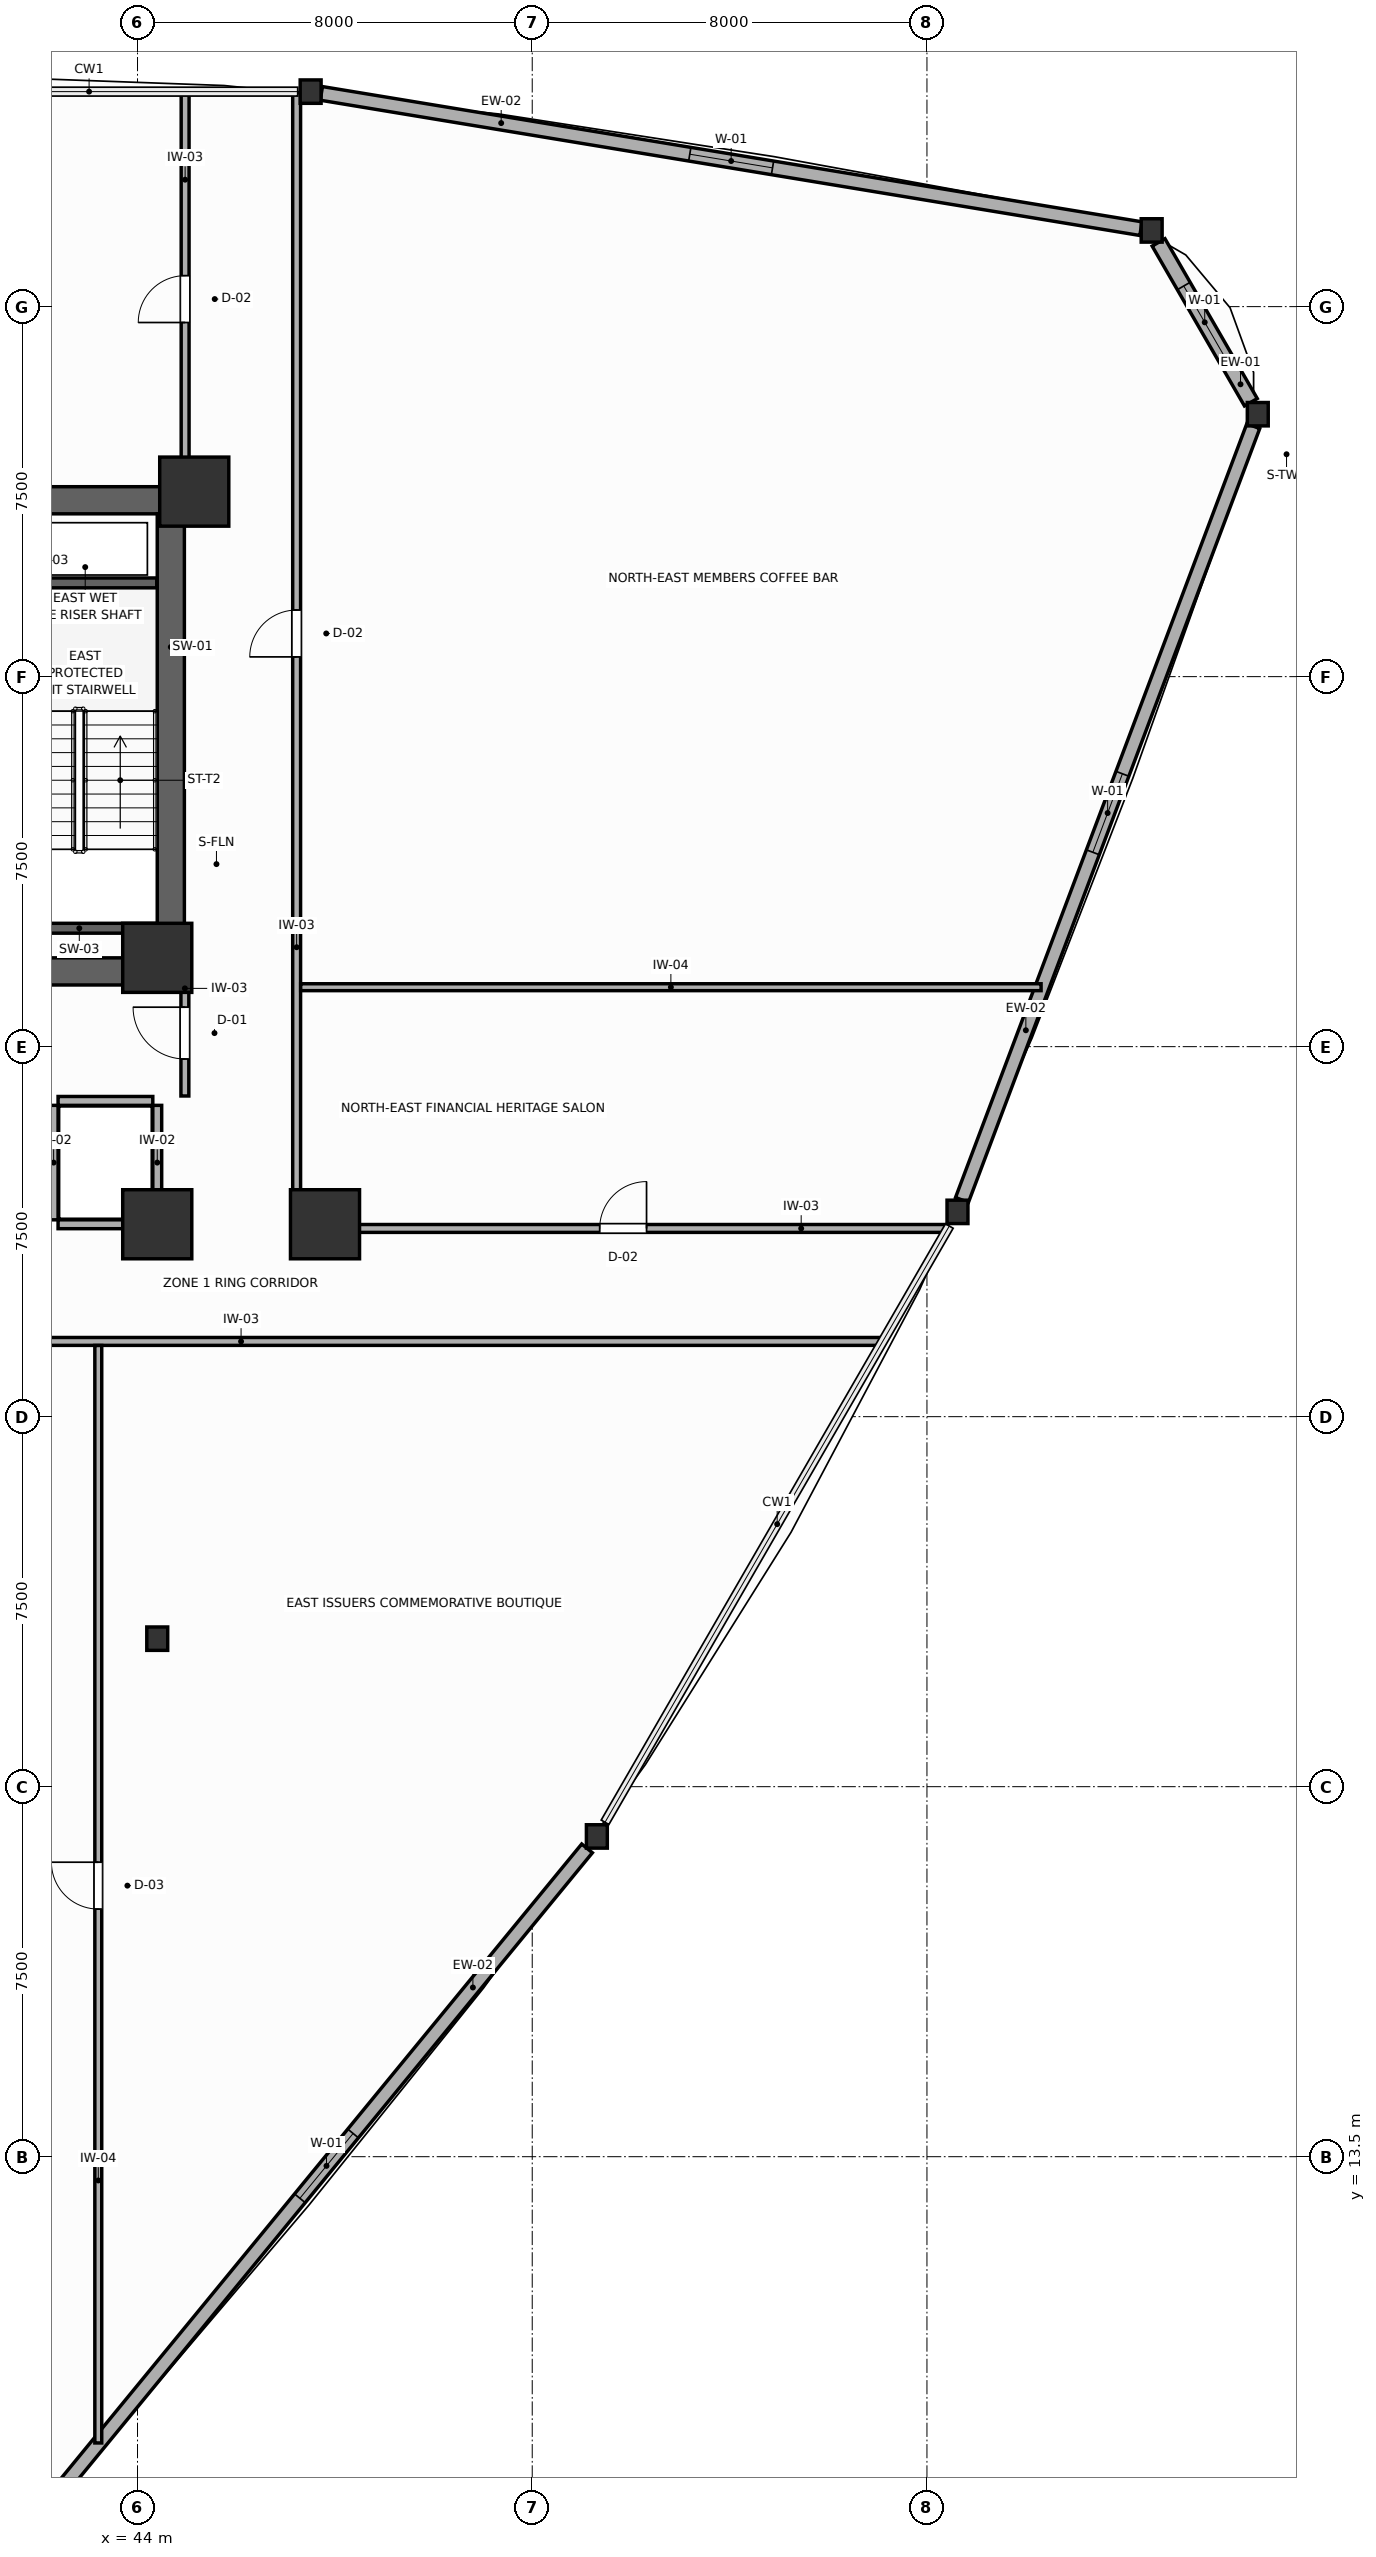
"""IFC4 building model, lengths in metres.
Left out: names, types, materials, properties, quantities, classifications, styles, units other than length and angle.
Written with IfcOpenShell. Run it as: python <this file> out.ifc"""

import sys

from ifc_helpers import new_model, si_unit, direction, frame, frame_2d, origin, origin_2d, place, context, subcontext, project, spatial, rectangle, i_section, extrude, source, transform, mapped, element, fill, save


model = new_model("IFC4")
c1 = context("Model", 3, precision=1e-05, world=origin(), true_north=direction((0.0, 1.0)))
c2 = subcontext(c1, "Body", "Model", "MODEL_VIEW")
j1 = project(units=[si_unit("LENGTHUNIT", "METRE"), si_unit("PLANEANGLEUNIT", "RADIAN")], contexts=[c1])
p1 = place(None, origin())
s1 = spatial("IfcSite", under=j1, at=p1, CompositionType="ELEMENT")
p2 = place(p1, origin())
s2 = spatial("IfcBuilding", under=s1, at=p2, CompositionType="ELEMENT")
p3 = place(p2, frame((0.0, 0.0, 87.3)))
s3 = spatial("IfcBuildingStorey", under=s2, at=p3, CompositionType="ELEMENT", Elevation=87.3)
p4 = place(p3, frame((27.05, 47.075, 0.0), z_axis=(0.0, 0.0, 1.0), x_axis=(1.0, 0.0, 0.0)))
e1 = element("IfcWall", 1, at=p4, inside=s3, PredefinedType="SHEAR", context=c2, shape_type="SweptSolid", body=[
    extrude(rectangle(XDim=17.9, YDim=0.55, at=frame_2d((8.95, 0.0))), origin(), (0.0, 0.0, 1.0), 3.9),
])
p5 = place(p3, frame((27.05, 37.525, 0.0), z_axis=(0.0, 0.0, 1.0), x_axis=(1.0, 0.0, 0.0)))
e2 = element("IfcWall", 2, at=p5, inside=s3, PredefinedType="SHEAR", context=c2, shape_type="SweptSolid", body=[
    extrude(rectangle(XDim=17.9, YDim=0.55, at=frame_2d((8.95, 0.0))), origin(), (0.0, 0.0, 1.0), 3.9),
])
p6 = place(p5, frame((4.975, 0.0, 0.0)))
e3 = element("IfcOpeningElement", 3, at=p6, cuts=e2, PredefinedType="OPENING", context=c2, shape_type="SweptSolid", body=[
    extrude(rectangle(XDim=1.05, YDim=2.1, at=frame_2d((0.525, 1.05))), frame((0.0, 0.285, 0.0), z_axis=(0.0, -1.0, 0.0), x_axis=(1.0, 0.0, 0.0)), (0.0, 0.0, 1.0), 0.57),
])
p7 = place(p5, frame((11.875, 0.0, 0.0)))
e4 = element("IfcOpeningElement", 4, at=p7, cuts=e2, PredefinedType="OPENING", context=c2, shape_type="SweptSolid", body=[
    extrude(rectangle(XDim=1.05, YDim=2.1, at=frame_2d((0.525, 1.05))), frame((0.0, 0.285, 0.0), z_axis=(0.0, -1.0, 0.0), x_axis=(1.0, 0.0, 0.0)), (0.0, 0.0, 1.0), 0.57),
])
p8 = place(p3, frame((44.675, 37.8, 0.0), z_axis=(0.0, 0.0, 1.0), x_axis=(0.0, 1.0, 0.0)))
e5 = element("IfcWall", 5, at=p8, inside=s3, PredefinedType="SHEAR", context=c2, shape_type="SweptSolid", body=[
    extrude(rectangle(XDim=9.0, YDim=0.55, at=frame_2d((4.5, 0.0))), origin(), (0.0, 0.0, 1.0), 3.9),
])
m1 = source(origin(), c2, "Body", "SweptSolid", [
    extrude(rectangle(XDim=1.4, YDim=1.4, at=origin_2d()), origin(), (0.0, 0.0, 1.0), 3.9),
])
for number, where, z_axis, x_axis in (
    (6, (45.15, 47.25, 0.0), (0.0, 0.0, 1.0), (1.0, 0.0, 0.0)),
    (7, (44.4, 37.8, 0.0), (0.0, 0.0, 1.0), (1.0, 0.0, 0.0)),
    (8, (44.4, 32.4, 0.0), (0.0, 0.0, 1.0), (1.0, 0.0, 0.0)),
    (9, (47.8, 32.4, 0.0), (0.0, 0.0, 1.0), (1.0, 0.0, 0.0)),
):
    element("IfcColumn", number, at=place(p3, frame(where, z_axis=z_axis, x_axis=x_axis)), inside=s3, PredefinedType="COLUMN", context=c2, shape_type="MappedRepresentation", body=[
        mapped(m1, transform((0.0, 0.0, 0.0), scale=1.0)),
    ])
m2 = source(origin(), c2, "Body", "SweptSolid", [
    extrude(i_section(OverallWidth=0.424, OverallDepth=0.474, WebThickness=0.045, FlangeThickness=0.072, FilletRadius=0.015, at=origin_2d()), origin(), (0.0, 0.0, 1.0), 3.9),
])
for number, where, z_axis, x_axis in (
    (10, (44.4, 24.0, 0.0), (0.0, 0.0, 1.0), (1.0, 0.0, 0.0)),
    (11, (66.705, 48.82, 0.0), (0.0, 0.0, 1.0), (1.0, 0.0, 0.0)),
    (12, (64.554, 52.544, 0.0), (0.0, 0.0, 1.0), (1.0, 0.0, 0.0)),
    (13, (47.509, 55.358, 0.0), (0.0, 0.0, 1.0), (1.0, 0.0, 0.0)),
    (14, (53.31, 19.991, 0.0), (0.0, 0.0, 1.0), (1.0, 0.0, 0.0)),
    (15, (60.619, 32.651, 0.0), (0.0, 0.0, 1.0), (1.0, 0.0, 0.0)),
):
    element("IfcColumn", number, at=place(p3, frame(where, z_axis=z_axis, x_axis=x_axis)), inside=s3, PredefinedType="COLUMN", context=c2, shape_type="MappedRepresentation", body=[
        mapped(m2, transform((0.0, 0.0, 0.0), scale=1.0)),
    ])
p9 = place(p3, frame((66.565, 49.062, 0.0), z_axis=(0.0, 0.0, 1.0), x_axis=(-0.500012356405, 0.866018269693, 0.0)))
e16 = element("IfcWall", 16, at=p9, inside=s3, PredefinedType="SOLIDWALL", context=c2, shape_type="SweptSolid", body=[
    extrude(rectangle(XDim=3.742, YDim=0.3, at=frame_2d((1.871, 0.0))), origin(), (0.0, 0.0, 1.0), 3.23),
])
p10 = place(p9, frame((1.021, 0.0, 0.75)))
e17 = element("IfcOpeningElement", 17, at=p10, cuts=e16, PredefinedType="OPENING", context=c2, shape_type="SweptSolid", body=[
    extrude(rectangle(XDim=1.7, YDim=1.75, at=frame_2d((0.85, 0.875))), frame((0.0, 0.16, 0.0), z_axis=(0.0, -1.0, 0.0), x_axis=(1.0, 0.0, 0.0)), (0.0, 0.0, 1.0), 0.32),
])
p11 = place(p3, frame((64.337, 52.58, 0.0), z_axis=(0.0, 0.0, 1.0), x_axis=(-0.986649040197, 0.162860896097, 0.0)))
e18 = element("IfcWall", 18, at=p11, inside=s3, PredefinedType="SOLIDWALL", context=c2, shape_type="SweptSolid", body=[
    extrude(rectangle(XDim=16.836, YDim=0.28, at=frame_2d((8.418, 0.0))), origin(), (0.0, 0.0, 1.0), 3.23),
])
p12 = place(p11, frame((7.568, 0.0, 0.75)))
e19 = element("IfcOpeningElement", 19, at=p12, cuts=e18, PredefinedType="OPENING", context=c2, shape_type="SweptSolid", body=[
    extrude(rectangle(XDim=1.7, YDim=1.75, at=frame_2d((0.85, 0.875))), frame((0.0, 0.15, 0.0), z_axis=(0.0, -1.0, 0.0), x_axis=(1.0, 0.0, 0.0)), (0.0, 0.0, 1.0), 0.3),
])
p13 = place(p3, frame((42.549, 6.878, 0.0), z_axis=(0.0, 0.0, 1.0), x_axis=(0.634372560511, 0.77302746036, 0.0)))
e20 = element("IfcWall", 20, at=p13, inside=s3, PredefinedType="SOLIDWALL", context=c2, shape_type="SweptSolid", body=[
    extrude(rectangle(XDim=16.65, YDim=0.28, at=frame_2d((8.325, 0.0))), origin(), (0.0, 0.0, 1.0), 3.23),
])
p14 = place(p13, frame((7.475, 0.0, 0.75)))
e21 = element("IfcOpeningElement", 21, at=p14, cuts=e20, PredefinedType="OPENING", context=c2, shape_type="SweptSolid", body=[
    extrude(rectangle(XDim=1.7, YDim=1.75, at=frame_2d((0.85, 0.875))), frame((0.0, 0.15, 0.0), z_axis=(0.0, -1.0, 0.0), x_axis=(1.0, 0.0, 0.0)), (0.0, 0.0, 1.0), 0.3),
])
p15 = place(p3, frame((60.71, 32.893, 0.0), z_axis=(0.0, 0.0, 1.0), x_axis=(0.352291780657, 0.935890218605, 0.0)))
e22 = element("IfcWall", 22, at=p15, inside=s3, PredefinedType="SOLIDWALL", context=c2, shape_type="SweptSolid", body=[
    extrude(rectangle(XDim=16.759, YDim=0.28, at=frame_2d((8.379, 0.0))), origin(), (0.0, 0.0, 1.0), 3.23),
])
p16 = place(p15, frame((7.53, 0.0, 0.75)))
e23 = element("IfcOpeningElement", 23, at=p16, cuts=e22, PredefinedType="OPENING", context=c2, shape_type="SweptSolid", body=[
    extrude(rectangle(XDim=1.7, YDim=1.75, at=frame_2d((0.85, 0.875))), frame((0.0, 0.15, 0.0), z_axis=(0.0, -1.0, 0.0), x_axis=(1.0, 0.0, 0.0)), (0.0, 0.0, 1.0), 0.3),
])
for number, where, z_axis, x_axis in (
    (24, (41.25, 45.4, 0.0), (0.0, 0.0, 1.0), (1.0, 0.0, 0.0)),
    (25, (41.25, 38.4, 0.0), (0.0, 0.0, 1.0), (1.0, 0.0, 0.0)),
):
    element("IfcWall", number, at=place(p3, frame(where, z_axis=z_axis, x_axis=x_axis)), inside=s3, PredefinedType="SHEAR", context=c2, shape_type="SweptSolid", body=[
        extrude(rectangle(XDim=3.14, YDim=0.2, at=frame_2d((1.57, 0.0))), origin(), (0.0, 0.0, 1.0), 3.9),
    ])
p17 = place(p3, frame((42.39, 34.9, 0.0), z_axis=(0.0, 0.0, 1.0), x_axis=(1.0, 0.0, 0.0)))
e26 = element("IfcWall", 26, at=p17, inside=s3, PredefinedType="PARTITIONING", context=c2, shape_type="SweptSolid", body=[
    extrude(rectangle(XDim=1.92, YDim=0.18, at=frame_2d((0.96, 0.0))), origin(), (0.0, 0.0, 1.0), 3.68),
])
p18 = place(p3, frame((42.39, 32.4, 0.0), z_axis=(0.0, 0.0, 1.0), x_axis=(1.0, 0.0, 0.0)))
e27 = element("IfcWall", 27, at=p18, inside=s3, PredefinedType="PARTITIONING", context=c2, shape_type="SweptSolid", body=[
    extrude(rectangle(XDim=1.92, YDim=0.18, at=frame_2d((0.96, 0.0))), origin(), (0.0, 0.0, 1.0), 3.18),
])
for number, where, z_axis, x_axis in (
    (28, (42.3, 32.49, 0.0), (0.0, 0.0, 1.0), (0.0, 1.0, 0.0)),
    (29, (44.4, 32.49, 0.0), (0.0, 0.0, 1.0), (0.0, 1.0, 0.0)),
):
    element("IfcWall", number, at=place(p3, frame(where, z_axis=z_axis, x_axis=x_axis)), inside=s3, PredefinedType="PARTITIONING", context=c2, shape_type="SweptSolid", body=[
        extrude(rectangle(XDim=2.32, YDim=0.18, at=frame_2d((1.16, 0.0))), origin(), (0.0, 0.0, 1.0), 3.68),
    ])
p19 = place(p3, frame((44.96, 35.0, 0.0), z_axis=(0.0, 0.0, 1.0), x_axis=(0.0, 1.0, 0.0)))
e30 = element("IfcWall", 30, at=p19, inside=s3, PredefinedType="PARTITIONING", context=c2, shape_type="SweptSolid", body=[
    extrude(rectangle(XDim=2.65, YDim=0.16, at=frame_2d((1.325, 0.0))), origin(), (0.0, 0.0, 1.0), 3.68),
])
p20 = place(p19, frame((0.75, 0.0, 0.0)))
e31 = element("IfcOpeningElement", 31, at=p20, cuts=e30, PredefinedType="OPENING", context=c2, shape_type="SweptSolid", body=[
    extrude(rectangle(XDim=1.05, YDim=2.1, at=frame_2d((0.525, 1.05))), frame((0.0, 0.09, 0.0), z_axis=(0.0, -1.0, 0.0), x_axis=(1.0, 0.0, 0.0)), (0.0, 0.0, 1.0), 0.18),
])
p21 = place(p3, frame((21.317, 30.025, 0.0), z_axis=(0.0, 0.0, 1.0), x_axis=(1.0, 0.0, 0.0)))
e32 = element("IfcWall", 32, at=p21, inside=s3, PredefinedType="PARTITIONING", context=c2, shape_type="SweptSolid", body=[
    extrude(rectangle(XDim=37.766, YDim=0.16, at=frame_2d((18.883, 0.0))), origin(), (0.0, 0.0, 1.0), 3.68),
])
p22 = place(p21, frame((10.668, 0.0, 0.0)))
e33 = element("IfcOpeningElement", 33, at=p22, cuts=e32, PredefinedType="OPENING", context=c2, shape_type="SweptSolid", body=[
    extrude(rectangle(XDim=0.95, YDim=2.05, at=frame_2d((0.475, 1.025))), frame((0.0, 0.09, 0.0), z_axis=(0.0, -1.0, 0.0), x_axis=(1.0, 0.0, 0.0)), (0.0, 0.0, 1.0), 0.18),
])
p23 = place(p21, frame((0.38, 0.0, 0.0)))
e34 = element("IfcOpeningElement", 34, at=p23, cuts=e32, PredefinedType="OPENING", context=c2, shape_type="SweptSolid", body=[
    extrude(rectangle(XDim=0.95, YDim=2.05, at=frame_2d((0.475, 1.025))), frame((0.0, 0.09, 0.0), z_axis=(0.0, -1.0, 0.0), x_axis=(1.0, 0.0, 0.0)), (0.0, 0.0, 1.0), 0.18),
])
p24 = place(p3, frame((47.225, 32.31, 0.0), z_axis=(0.0, 0.0, 1.0), x_axis=(0.0, 1.0, 0.0)))
e35 = element("IfcWall", 35, at=p24, inside=s3, PredefinedType="PARTITIONING", context=c2, shape_type="SweptSolid", body=[
    extrude(rectangle(XDim=23.028, YDim=0.16, at=frame_2d((11.514, 0.0))), origin(), (0.0, 0.0, 1.0), 3.18),
])
p25 = place(p24, frame((11.59, 0.0, 0.0)))
e36 = element("IfcOpeningElement", 36, at=p25, cuts=e35, PredefinedType="OPENING", context=c2, shape_type="SweptSolid", body=[
    extrude(rectangle(XDim=0.95, YDim=2.05, at=frame_2d((0.475, 1.025))), frame((0.0, 0.09, 0.0), z_axis=(0.0, -1.0, 0.0), x_axis=(1.0, 0.0, 0.0)), (0.0, 0.0, 1.0), 0.18),
])
p26 = place(p3, frame((47.307, 32.315, 0.0), z_axis=(0.0, 0.0, 1.0), x_axis=(1.0, 0.0, 0.0)))
e37 = element("IfcWall", 37, at=p26, inside=s3, PredefinedType="PARTITIONING", context=c2, shape_type="SweptSolid", body=[
    extrude(rectangle(XDim=13.098, YDim=0.16, at=frame_2d((6.549, 0.0))), origin(), (0.0, 0.0, 1.0), 3.18),
])
p27 = place(p26, frame((6.06, 0.0, 0.0)))
e38 = element("IfcOpeningElement", 38, at=p27, cuts=e37, PredefinedType="OPENING", context=c2, shape_type="SweptSolid", body=[
    extrude(rectangle(XDim=0.95, YDim=2.05, at=frame_2d((0.475, 1.025))), frame((0.0, 0.09, 0.0), z_axis=(0.0, -1.0, 0.0), x_axis=(1.0, 0.0, 0.0)), (0.0, 0.0, 1.0), 0.18),
])
p28 = place(p3, frame((44.965, 47.18, 0.0), z_axis=(0.0, 0.0, 1.0), x_axis=(0.0, 1.0, 0.0)))
e39 = element("IfcWall", 39, at=p28, inside=s3, PredefinedType="PARTITIONING", context=c2, shape_type="SweptSolid", body=[
    extrude(rectangle(XDim=8.158, YDim=0.16, at=frame_2d((4.079, 0.0))), origin(), (0.0, 0.0, 1.0), 3.68),
])
p29 = place(p28, frame((3.498, 0.0, 0.0)))
e40 = element("IfcOpeningElement", 40, at=p29, cuts=e39, PredefinedType="OPENING", context=c2, shape_type="SweptSolid", body=[
    extrude(rectangle(XDim=0.95, YDim=2.05, at=frame_2d((0.475, 1.025))), frame((0.0, 0.09, 0.0), z_axis=(0.0, -1.0, 0.0), x_axis=(1.0, 0.0, 0.0)), (0.0, 0.0, 1.0), 0.18),
])
p30 = place(p3, frame((43.205, 7.698, 0.0), z_axis=(0.0, 0.0, 1.0), x_axis=(0.0, 1.0, 0.0)))
e41 = element("IfcWall", 41, at=p30, inside=s3, PredefinedType="PARTITIONING", context=c2, shape_type="SweptSolid", body=[
    extrude(rectangle(XDim=22.246, YDim=0.14, at=frame_2d((11.123, 0.0))), origin(), (0.0, 0.0, 1.0), 3.18),
])
p31 = place(p30, frame((10.821, 0.0, 0.0)))
e42 = element("IfcOpeningElement", 42, at=p31, cuts=e41, PredefinedType="OPENING", context=c2, shape_type="SweptSolid", body=[
    extrude(rectangle(XDim=0.95, YDim=2.05, at=frame_2d((0.475, 1.025))), frame((0.0, 0.08, 0.0), z_axis=(0.0, -1.0, 0.0), x_axis=(1.0, 0.0, 0.0)), (0.0, 0.0, 1.0), 0.16),
])
p32 = place(p3, frame((47.307, 37.205, 0.0), z_axis=(0.0, 0.0, 1.0), x_axis=(1.0, 0.0, 0.0)))
e43 = element("IfcWall", 43, at=p32, inside=s3, PredefinedType="PARTITIONING", context=c2, shape_type="SweptSolid", body=[
    extrude(rectangle(XDim=15.006, YDim=0.14, at=frame_2d((7.503, 0.0))), origin(), (0.0, 0.0, 1.0), 3.68),
])
p33 = place(p10, origin())
e44 = element("IfcWindow", 44, at=p33, inside=s3, PartitioningType="SINGLE_PANEL", PredefinedType="WINDOW", context=c2, shape_type="SweptSolid", body=[
    extrude(rectangle(XDim=1.7, YDim=1.75, at=frame_2d((0.85, 0.875))), frame((0.0, 0.03, 0.0), z_axis=(0.0, -1.0, 0.0), x_axis=(1.0, 0.0, 0.0)), (0.0, 0.0, 1.0), 0.06),
])
fill(e17, e44)
p34 = place(p12, origin())
e45 = element("IfcWindow", 45, at=p34, inside=s3, PartitioningType="SINGLE_PANEL", PredefinedType="WINDOW", context=c2, shape_type="SweptSolid", body=[
    extrude(rectangle(XDim=1.7, YDim=1.75, at=frame_2d((0.85, 0.875))), frame((0.0, 0.03, 0.0), z_axis=(0.0, -1.0, 0.0), x_axis=(1.0, 0.0, 0.0)), (0.0, 0.0, 1.0), 0.06),
])
fill(e19, e45)
p35 = place(p14, origin())
e46 = element("IfcWindow", 46, at=p35, inside=s3, PartitioningType="SINGLE_PANEL", PredefinedType="WINDOW", context=c2, shape_type="SweptSolid", body=[
    extrude(rectangle(XDim=1.7, YDim=1.75, at=frame_2d((0.85, 0.875))), frame((0.0, 0.03, 0.0), z_axis=(0.0, -1.0, 0.0), x_axis=(1.0, 0.0, 0.0)), (0.0, 0.0, 1.0), 0.06),
])
fill(e21, e46)
p36 = place(p16, origin())
e47 = element("IfcWindow", 47, at=p36, inside=s3, PartitioningType="SINGLE_PANEL", PredefinedType="WINDOW", context=c2, shape_type="SweptSolid", body=[
    extrude(rectangle(XDim=1.7, YDim=1.75, at=frame_2d((0.85, 0.875))), frame((0.0, 0.03, 0.0), z_axis=(0.0, -1.0, 0.0), x_axis=(1.0, 0.0, 0.0)), (0.0, 0.0, 1.0), 0.06),
])
fill(e23, e47)
p37 = place(p20, origin())
e48 = element("IfcDoor", 48, at=p37, inside=s3, OperationType="SINGLE_SWING_RIGHT", PredefinedType="DOOR", context=c2, shape_type="SweptSolid", body=[
    extrude(rectangle(XDim=1.05, YDim=2.1, at=frame_2d((0.525, 1.05))), frame((0.0, 0.025, 0.0), z_axis=(0.0, -1.0, 0.0), x_axis=(1.0, 0.0, 0.0)), (0.0, 0.0, 1.0), 0.05),
])
fill(e31, e48)
p38 = place(p25, origin())
e49 = element("IfcDoor", 49, at=p38, inside=s3, OperationType="SINGLE_SWING_LEFT", PredefinedType="DOOR", context=c2, shape_type="SweptSolid", body=[
    extrude(rectangle(XDim=0.95, YDim=2.05, at=frame_2d((0.475, 1.025))), frame((0.0, 0.025, 0.0), z_axis=(0.0, -1.0, 0.0), x_axis=(1.0, 0.0, 0.0)), (0.0, 0.0, 1.0), 0.05),
])
fill(e36, e49)
p39 = place(p27, origin())
e50 = element("IfcDoor", 50, at=p39, inside=s3, OperationType="SINGLE_SWING_RIGHT", PredefinedType="DOOR", context=c2, shape_type="SweptSolid", body=[
    extrude(rectangle(XDim=0.95, YDim=2.05, at=frame_2d((0.475, 1.025))), frame((0.0, 0.025, 0.0), z_axis=(0.0, -1.0, 0.0), x_axis=(1.0, 0.0, 0.0)), (0.0, 0.0, 1.0), 0.05),
])
fill(e38, e50)
p40 = place(p29, origin())
e51 = element("IfcDoor", 51, at=p40, inside=s3, OperationType="SINGLE_SWING_LEFT", PredefinedType="DOOR", context=c2, shape_type="SweptSolid", body=[
    extrude(rectangle(XDim=0.95, YDim=2.05, at=frame_2d((0.475, 1.025))), frame((0.0, 0.025, 0.0), z_axis=(0.0, -1.0, 0.0), x_axis=(1.0, 0.0, 0.0)), (0.0, 0.0, 1.0), 0.05),
])
fill(e40, e51)
p41 = place(p31, origin())
e52 = element("IfcDoor", 52, at=p41, inside=s3, OperationType="SINGLE_SWING_RIGHT", PredefinedType="DOOR", context=c2, shape_type="SweptSolid", body=[
    extrude(rectangle(XDim=0.95, YDim=2.05, at=frame_2d((0.475, 1.025))), frame((0.0, 0.025, 0.0), z_axis=(0.0, -1.0, 0.0), x_axis=(1.0, 0.0, 0.0)), (0.0, 0.0, 1.0), 0.05),
])
fill(e42, e52)
save(model, sys.argv[1])
